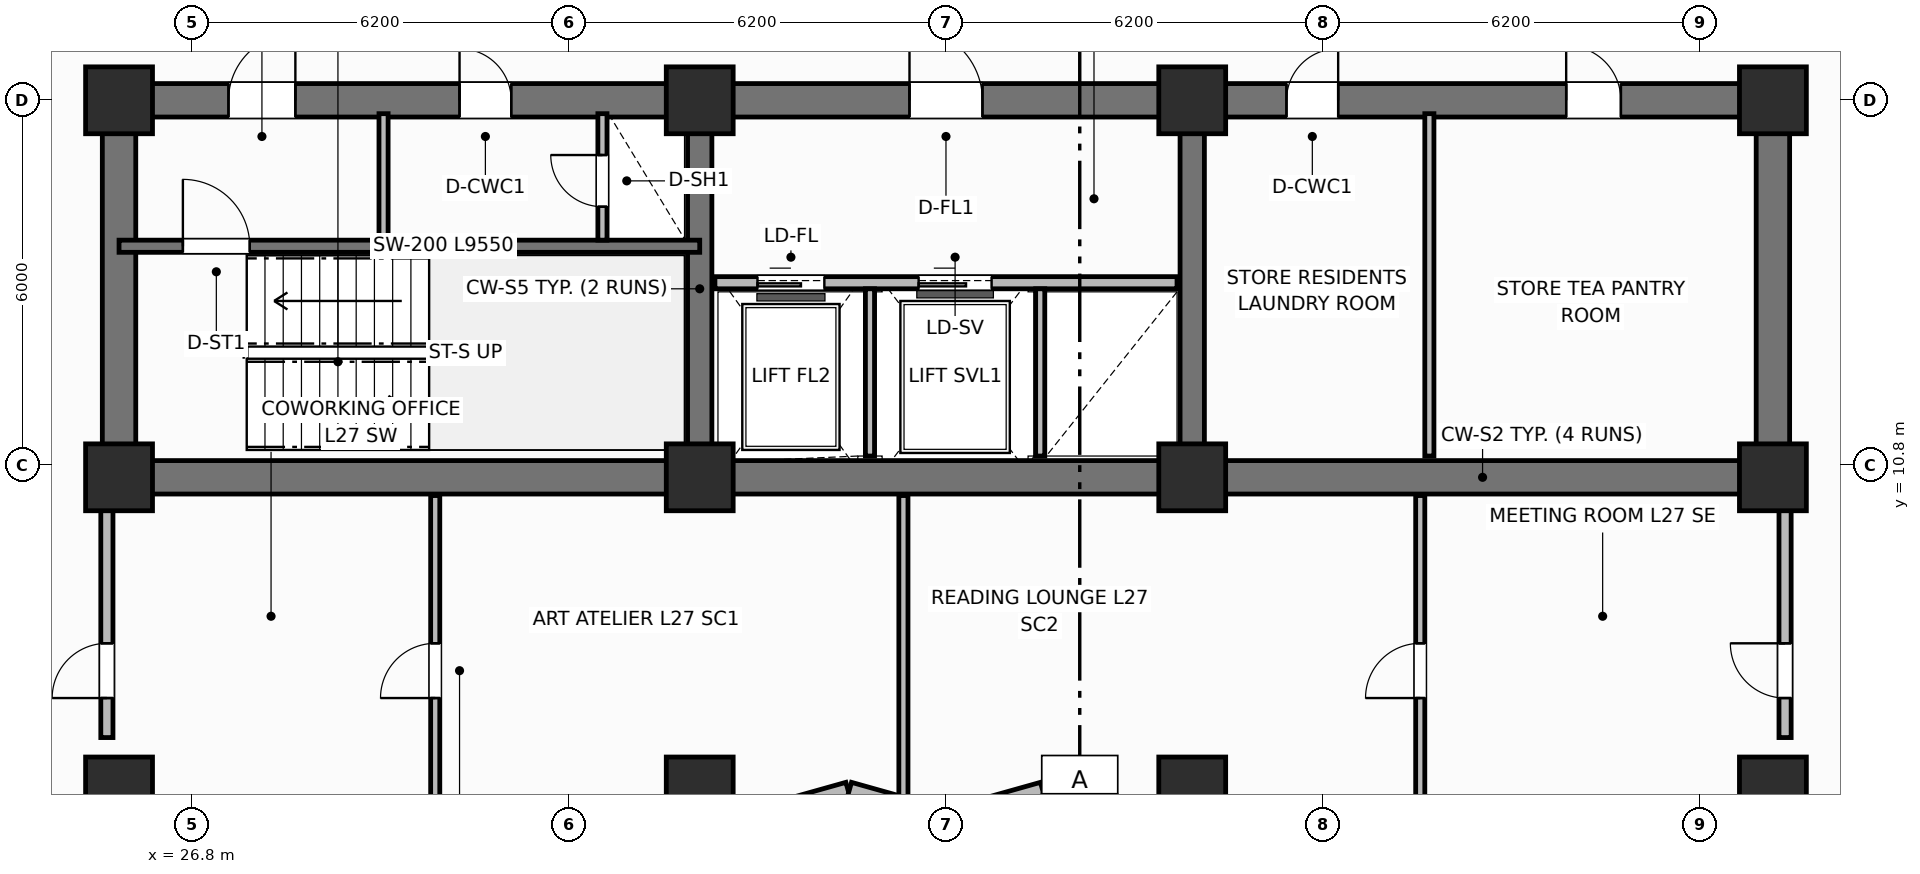
"""IFC4 building model, lengths in metres.
Left out: names, types, materials, properties, quantities, classifications, styles, units other than length and angle.
Written with IfcOpenShell. Run it as: python <this file> out.ifc"""

import sys

from ifc_helpers import new_model, si_unit, direction, frame, frame_2d, origin, origin_2d, place, context, subcontext, project, spatial, rectangle, extrude, element, fill, save


model = new_model("IFC4")
c1 = context("Model", 3, precision=1e-05, world=origin(), true_north=direction((0.0, 1.0)))
c2 = subcontext(c1, "Body", "Model", "MODEL_VIEW")
j1 = project(units=[si_unit("LENGTHUNIT", "METRE"), si_unit("PLANEANGLEUNIT", "RADIAN")], contexts=[c1])
p1 = place(None, origin())
s1 = spatial("IfcSite", under=j1, at=p1, CompositionType="ELEMENT")
p2 = place(p1, origin())
s2 = spatial("IfcBuilding", under=s1, at=p2, CompositionType="ELEMENT")
p3 = place(p2, frame((0.0, 0.0, 110.5)))
s3 = spatial("IfcBuildingStorey", under=s2, at=p3, CompositionType="ELEMENT", Elevation=110.5)
p4 = place(p3, frame((52.8, 10.6, 0.0), z_axis=(0.0, 0.0, 1.0), x_axis=(-1.0, 0.0, 0.0)))
e1 = element("IfcWall", 1, at=p4, inside=s3, PredefinedType="SHEAR", context=c2, shape_type="SweptSolid", body=[
    extrude(rectangle(XDim=27.2, YDim=0.55, at=frame_2d((13.6, 0.0))), origin(), (0.0, 0.0, 1.0), 3.7),
])
for number, where, z_axis, x_axis in (
    (2, (25.6, 10.875, 0.0), (0.0, 0.0, 1.0), (0.0, 1.0, 0.0)),
    (3, (52.8, 10.875, 0.0), (0.0, 0.0, 1.0), (0.0, 1.0, 0.0)),
):
    element("IfcWall", number, at=place(p3, frame(where, z_axis=z_axis, x_axis=x_axis)), inside=s3, PredefinedType="SHEAR", context=c2, shape_type="SweptSolid", body=[
        extrude(rectangle(XDim=5.65, YDim=0.55, at=frame_2d((2.825, 0.0))), origin(), (0.0, 0.0, 1.0), 3.7),
    ])
p5 = place(p3, frame((25.6, 16.8, 0.0), z_axis=(0.0, 0.0, 1.0), x_axis=(1.0, 0.0, 0.0)))
e4 = element("IfcWall", 4, at=p5, inside=s3, PredefinedType="SHEAR", context=c2, shape_type="SweptSolid", body=[
    extrude(rectangle(XDim=27.2, YDim=0.55, at=frame_2d((13.6, 0.0))), origin(), (0.0, 0.0, 1.0), 3.7),
])
p6 = place(p5, frame((1.8, 0.0, 0.0)))
e5 = element("IfcOpeningElement", 5, at=p6, cuts=e4, PredefinedType="OPENING", context=c2, shape_type="SweptSolid", body=[
    extrude(rectangle(XDim=1.1, YDim=2.15, at=frame_2d((0.55, 1.075))), frame((0.0, 0.285, 0.0), z_axis=(0.0, -1.0, 0.0), x_axis=(1.0, 0.0, 0.0)), (0.0, 0.0, 1.0), 0.57),
])
p7 = place(p5, frame((5.6, 0.0, 0.0)))
e6 = element("IfcOpeningElement", 6, at=p7, cuts=e4, PredefinedType="OPENING", context=c2, shape_type="SweptSolid", body=[
    extrude(rectangle(XDim=0.85, YDim=2.1, at=frame_2d((0.425, 1.05))), frame((0.0, 0.285, 0.0), z_axis=(0.0, -1.0, 0.0), x_axis=(1.0, 0.0, 0.0)), (0.0, 0.0, 1.0), 0.57),
])
p8 = place(p5, frame((13.0, 0.0, 0.0)))
e7 = element("IfcOpeningElement", 7, at=p8, cuts=e4, PredefinedType="OPENING", context=c2, shape_type="SweptSolid", body=[
    extrude(rectangle(XDim=1.2, YDim=2.15, at=frame_2d((0.6, 1.075))), frame((0.0, 0.285, 0.0), z_axis=(0.0, -1.0, 0.0), x_axis=(1.0, 0.0, 0.0)), (0.0, 0.0, 1.0), 0.57),
])
p9 = place(p5, frame((19.2, 0.0, 0.0)))
e8 = element("IfcOpeningElement", 8, at=p9, cuts=e4, PredefinedType="OPENING", context=c2, shape_type="SweptSolid", body=[
    extrude(rectangle(XDim=0.85, YDim=2.1, at=frame_2d((0.425, 1.05))), frame((0.0, 0.285, 0.0), z_axis=(0.0, -1.0, 0.0), x_axis=(1.0, 0.0, 0.0)), (0.0, 0.0, 1.0), 0.57),
])
p10 = place(p5, frame((23.8, 0.0, 0.0)))
e9 = element("IfcOpeningElement", 9, at=p10, cuts=e4, PredefinedType="OPENING", context=c2, shape_type="SweptSolid", body=[
    extrude(rectangle(XDim=0.9, YDim=2.1, at=frame_2d((0.45, 1.05))), frame((0.0, 0.285, 0.0), z_axis=(0.0, -1.0, 0.0), x_axis=(1.0, 0.0, 0.0)), (0.0, 0.0, 1.0), 0.57),
])
for number, where, z_axis, x_axis in (
    (10, (35.15, 10.875, 0.0), (0.0, 0.0, 1.0), (0.0, 1.0, 0.0)),
    (11, (43.25, 10.875, 0.0), (0.0, 0.0, 1.0), (0.0, 1.0, 0.0)),
):
    element("IfcWall", number, at=place(p3, frame(where, z_axis=z_axis, x_axis=x_axis)), inside=s3, PredefinedType="SHEAR", context=c2, shape_type="SweptSolid", body=[
        extrude(rectangle(XDim=5.65, YDim=0.4, at=frame_2d((2.825, 0.0))), origin(), (0.0, 0.0, 1.0), 3.7),
    ])
for number, where, z_axis, x_axis in (
    (12, (25.6, 10.6, 0.0), (0.0, 0.0, 1.0), (1.0, 0.0, 0.0)),
    (13, (25.6, 16.8, 0.0), (0.0, 0.0, 1.0), (1.0, 0.0, 0.0)),
    (14, (35.15, 10.6, 0.0), (0.0, 0.0, 1.0), (1.0, 0.0, 0.0)),
    (15, (35.15, 16.8, 0.0), (0.0, 0.0, 1.0), (1.0, 0.0, 0.0)),
    (16, (43.25, 10.6, 0.0), (0.0, 0.0, 1.0), (1.0, 0.0, 0.0)),
    (17, (43.25, 16.8, 0.0), (0.0, 0.0, 1.0), (1.0, 0.0, 0.0)),
    (18, (52.8, 10.6, 0.0), (0.0, 0.0, 1.0), (1.0, 0.0, 0.0)),
    (19, (52.8, 16.8, 0.0), (0.0, 0.0, 1.0), (1.0, 0.0, 0.0)),
    (20, (25.6, 5.45, 0.0), (0.0, 0.0, 1.0), (1.0, 0.0, 0.0)),
    (21, (35.15, 5.45, 0.0), (0.0, 0.0, 1.0), (1.0, 0.0, 0.0)),
    (22, (43.25, 5.45, 0.0), (0.0, 0.0, 1.0), (1.0, 0.0, 0.0)),
    (23, (52.8, 5.45, 0.0), (0.0, 0.0, 1.0), (1.0, 0.0, 0.0)),
):
    element("IfcColumn", number, at=place(p3, frame(where, z_axis=z_axis, x_axis=x_axis)), inside=s3, PredefinedType="COLUMN", context=c2, shape_type="SweptSolid", body=[
        extrude(rectangle(XDim=1.1, YDim=1.1, at=origin_2d()), origin(), (0.0, 0.0, 1.0), 3.7),
    ])
p11 = place(p3, frame((36.0, 4.97, 0.0), z_axis=(0.0, 0.0, 1.0), x_axis=(0.962662902433, 0.270703040766, 0.0)))
e24 = element("IfcWall", 24, at=p11, inside=s3, PredefinedType="SOLIDWALL", context=c2, shape_type="SweptSolid", body=[
    extrude(rectangle(XDim=1.662, YDim=0.34, at=frame_2d((0.831, 0.0))), origin(), (0.0, 0.0, 1.0), 2.7),
])
p12 = place(p3, frame((37.6, 5.42, 0.0), z_axis=(0.0, 0.0, 1.0), x_axis=(0.962652136636, -0.270741322725, 0.0)))
e25 = element("IfcWall", 25, at=p12, inside=s3, PredefinedType="SOLIDWALL", context=c2, shape_type="SweptSolid", body=[
    extrude(rectangle(XDim=1.662, YDim=0.34, at=frame_2d((0.831, 0.0))), origin(), (0.0, 0.0, 1.0), 2.7),
])
p13 = place(p3, frame((39.2, 4.97, 0.0), z_axis=(0.0, 0.0, 1.0), x_axis=(0.962662902433, 0.270703040766, 0.0)))
e26 = element("IfcWall", 26, at=p13, inside=s3, PredefinedType="SOLIDWALL", context=c2, shape_type="SweptSolid", body=[
    extrude(rectangle(XDim=1.662, YDim=0.34, at=frame_2d((0.831, 0.0))), origin(), (0.0, 0.0, 1.0), 2.7),
])
p14 = place(p3, frame((40.8, 5.42, 0.0), z_axis=(0.0, 0.0, 1.0), x_axis=(0.962652136636, -0.270741322725, 0.0)))
e27 = element("IfcWall", 27, at=p14, inside=s3, PredefinedType="SOLIDWALL", context=c2, shape_type="SweptSolid", body=[
    extrude(rectangle(XDim=1.662, YDim=0.34, at=frame_2d((0.831, 0.0))), origin(), (0.0, 0.0, 1.0), 2.7),
])
p15 = place(p3, frame((25.6, 14.4, 0.0), z_axis=(0.0, 0.0, 1.0), x_axis=(1.0, 0.0, 0.0)))
e28 = element("IfcWall", 28, at=p15, inside=s3, PredefinedType="SHEAR", context=c2, shape_type="SweptSolid", body=[
    extrude(rectangle(XDim=9.55, YDim=0.2, at=frame_2d((4.775, 0.0))), origin(), (0.0, 0.0, 1.0), 3.7),
])
p16 = place(p15, frame((1.05, 0.0, 0.0)))
e29 = element("IfcOpeningElement", 29, at=p16, cuts=e28, PredefinedType="OPENING", context=c2, shape_type="SweptSolid", body=[
    extrude(rectangle(XDim=1.1, YDim=2.15, at=frame_2d((0.55, 1.075))), frame((0.0, 0.11, 0.0), z_axis=(0.0, -1.0, 0.0), x_axis=(1.0, 0.0, 0.0)), (0.0, 0.0, 1.0), 0.22),
])
p17 = place(p3, frame((29.95, 14.5, 0.0), z_axis=(0.0, 0.0, 1.0), x_axis=(0.0, 1.0, 0.0)))
e30 = element("IfcWall", 30, at=p17, inside=s3, PredefinedType="PARTITIONING", context=c2, shape_type="SweptSolid", body=[
    extrude(rectangle(XDim=2.08, YDim=0.15, at=frame_2d((1.04, 0.0))), origin(), (0.0, 0.0, 1.0), 2.53),
])
p18 = place(p3, frame((33.55, 14.5, 0.0), z_axis=(0.0, 0.0, 1.0), x_axis=(0.0, 1.0, 0.0)))
e31 = element("IfcWall", 31, at=p18, inside=s3, PredefinedType="PARTITIONING", context=c2, shape_type="SweptSolid", body=[
    extrude(rectangle(XDim=2.08, YDim=0.15, at=frame_2d((1.04, 0.0))), origin(), (0.0, 0.0, 1.0), 2.53),
])
p19 = place(p18, frame((0.55, 0.0, 0.0)))
e32 = element("IfcOpeningElement", 32, at=p19, cuts=e31, PredefinedType="OPENING", context=c2, shape_type="SweptSolid", body=[
    extrude(rectangle(XDim=0.85, YDim=2.05, at=frame_2d((0.425, 1.025))), frame((0.0, 0.085, 0.0), z_axis=(0.0, -1.0, 0.0), x_axis=(1.0, 0.0, 0.0)), (0.0, 0.0, 1.0), 0.17),
])
p20 = place(p3, frame((35.4, 13.8, 0.0), z_axis=(0.0, 0.0, 1.0), x_axis=(1.0, 0.0, 0.0)))
e33 = element("IfcWall", 33, at=p20, inside=s3, PredefinedType="PARTITIONING", context=c2, shape_type="SweptSolid", body=[
    extrude(rectangle(XDim=7.6, YDim=0.2, at=frame_2d((3.8, 0.0))), origin(), (0.0, 0.0, 1.0), 2.3),
])
p21 = place(p20, frame((0.7, 0.0, 0.0)))
e34 = element("IfcOpeningElement", 34, at=p21, cuts=e33, PredefinedType="OPENING", context=c2, shape_type="SweptSolid", body=[
    extrude(rectangle(XDim=1.1, YDim=2.15, at=frame_2d((0.55, 1.075))), frame((0.0, 0.11, 0.0), z_axis=(0.0, -1.0, 0.0), x_axis=(1.0, 0.0, 0.0)), (0.0, 0.0, 1.0), 0.22),
])
p22 = place(p20, frame((3.35, 0.0, 0.0)))
e35 = element("IfcOpeningElement", 35, at=p22, cuts=e33, PredefinedType="OPENING", context=c2, shape_type="SweptSolid", body=[
    extrude(rectangle(XDim=1.2, YDim=2.15, at=frame_2d((0.6, 1.075))), frame((0.0, 0.11, 0.0), z_axis=(0.0, -1.0, 0.0), x_axis=(1.0, 0.0, 0.0)), (0.0, 0.0, 1.0), 0.22),
])
for number, where, z_axis, x_axis in (
    (36, (37.95, 10.95, 0.0), (0.0, 0.0, 1.0), (0.0, 1.0, 0.0)),
    (37, (40.75, 10.95, 0.0), (0.0, 0.0, 1.0), (0.0, 1.0, 0.0)),
):
    element("IfcWall", number, at=place(p3, frame(where, z_axis=z_axis, x_axis=x_axis)), inside=s3, PredefinedType="PARTITIONING", context=c2, shape_type="SweptSolid", body=[
        extrude(rectangle(XDim=2.75, YDim=0.15, at=frame_2d((1.375, 0.0))), origin(), (0.0, 0.0, 1.0), 2.53),
    ])
p23 = place(p3, frame((47.15, 10.95, 0.0), z_axis=(0.0, 0.0, 1.0), x_axis=(0.0, 1.0, 0.0)))
e38 = element("IfcWall", 38, at=p23, inside=s3, PredefinedType="PARTITIONING", context=c2, shape_type="SweptSolid", body=[
    extrude(rectangle(XDim=5.63, YDim=0.15, at=frame_2d((2.815, 0.0))), origin(), (0.0, 0.0, 1.0), 2.53),
])
p24 = place(p3, frame((30.8, 4.97, 0.0), z_axis=(0.0, 0.0, 1.0), x_axis=(0.0, 1.0, 0.0)))
e39 = element("IfcWall", 39, at=p24, inside=s3, PredefinedType="PARTITIONING", context=c2, shape_type="SweptSolid", body=[
    extrude(rectangle(XDim=5.33, YDim=0.15, at=frame_2d((2.665, 0.0))), origin(), (0.0, 0.0, 1.0), 2.53),
])
p25 = place(p24, frame((2.0, 0.0, 0.0)))
e40 = element("IfcOpeningElement", 40, at=p25, cuts=e39, PredefinedType="OPENING", context=c2, shape_type="SweptSolid", body=[
    extrude(rectangle(XDim=0.9, YDim=2.1, at=frame_2d((0.45, 1.05))), frame((0.0, 0.085, 0.0), z_axis=(0.0, -1.0, 0.0), x_axis=(1.0, 0.0, 0.0)), (0.0, 0.0, 1.0), 0.17),
])
p26 = place(p3, frame((38.5, 4.97, 0.0), z_axis=(0.0, 0.0, 1.0), x_axis=(0.0, 1.0, 0.0)))
e41 = element("IfcWall", 41, at=p26, inside=s3, PredefinedType="PARTITIONING", context=c2, shape_type="SweptSolid", body=[
    extrude(rectangle(XDim=5.33, YDim=0.15, at=frame_2d((2.665, 0.0))), origin(), (0.0, 0.0, 1.0), 2.53),
])
p27 = place(p3, frame((47.0, 4.97, 0.0), z_axis=(0.0, 0.0, 1.0), x_axis=(0.0, 1.0, 0.0)))
e42 = element("IfcWall", 42, at=p27, inside=s3, PredefinedType="PARTITIONING", context=c2, shape_type="SweptSolid", body=[
    extrude(rectangle(XDim=5.33, YDim=0.15, at=frame_2d((2.665, 0.0))), origin(), (0.0, 0.0, 1.0), 2.53),
])
p28 = place(p27, frame((2.0, 0.0, 0.0)))
e43 = element("IfcOpeningElement", 43, at=p28, cuts=e42, PredefinedType="OPENING", context=c2, shape_type="SweptSolid", body=[
    extrude(rectangle(XDim=0.9, YDim=2.1, at=frame_2d((0.45, 1.05))), frame((0.0, 0.085, 0.0), z_axis=(0.0, -1.0, 0.0), x_axis=(1.0, 0.0, 0.0)), (0.0, 0.0, 1.0), 0.17),
])
p29 = place(p3, frame((25.4, 6.32, 0.0), z_axis=(0.0, 0.0, 1.0), x_axis=(0.0, 1.0, 0.0)))
e44 = element("IfcWall", 44, at=p29, inside=s3, PredefinedType="PARTITIONING", context=c2, shape_type="SweptSolid", body=[
    extrude(rectangle(XDim=3.98, YDim=0.2, at=frame_2d((1.99, 0.0))), origin(), (0.0, 0.0, 1.0), 2.53),
])
p30 = place(p29, frame((0.65, 0.0, 0.0)))
e45 = element("IfcOpeningElement", 45, at=p30, cuts=e44, PredefinedType="OPENING", context=c2, shape_type="SweptSolid", body=[
    extrude(rectangle(XDim=0.9, YDim=2.1, at=frame_2d((0.45, 1.05))), frame((0.0, 0.11, 0.0), z_axis=(0.0, -1.0, 0.0), x_axis=(1.0, 0.0, 0.0)), (0.0, 0.0, 1.0), 0.22),
])
p31 = place(p3, frame((53.0, 6.32, 0.0), z_axis=(0.0, 0.0, 1.0), x_axis=(0.0, 1.0, 0.0)))
e46 = element("IfcWall", 46, at=p31, inside=s3, PredefinedType="PARTITIONING", context=c2, shape_type="SweptSolid", body=[
    extrude(rectangle(XDim=3.98, YDim=0.2, at=frame_2d((1.99, 0.0))), origin(), (0.0, 0.0, 1.0), 2.53),
])
p32 = place(p31, frame((0.65, 0.0, 0.0)))
e47 = element("IfcOpeningElement", 47, at=p32, cuts=e46, PredefinedType="OPENING", context=c2, shape_type="SweptSolid", body=[
    extrude(rectangle(XDim=0.9, YDim=2.1, at=frame_2d((0.45, 1.05))), frame((0.0, 0.11, 0.0), z_axis=(0.0, -1.0, 0.0), x_axis=(1.0, 0.0, 0.0)), (0.0, 0.0, 1.0), 0.22),
])
p33 = place(p16, origin())
e48 = element("IfcDoor", 48, at=p33, inside=s3, OperationType="SINGLE_SWING_LEFT", PredefinedType="DOOR", context=c2, shape_type="SweptSolid", body=[
    extrude(rectangle(XDim=1.1, YDim=2.15, at=frame_2d((0.55, 1.075))), frame((0.0, 0.025, 0.0), z_axis=(0.0, -1.0, 0.0), x_axis=(1.0, 0.0, 0.0)), (0.0, 0.0, 1.0), 0.05),
])
fill(e29, e48)
p34 = place(p19, origin())
e49 = element("IfcDoor", 49, at=p34, inside=s3, OperationType="SINGLE_SWING_RIGHT", PredefinedType="TRAPDOOR", context=c2, shape_type="SweptSolid", body=[
    extrude(rectangle(XDim=0.85, YDim=2.05, at=frame_2d((0.425, 1.025))), frame((0.0, 0.025, 0.0), z_axis=(0.0, -1.0, 0.0), x_axis=(1.0, 0.0, 0.0)), (0.0, 0.0, 1.0), 0.05),
])
fill(e32, e49)
p35 = place(p21, origin())
e50 = element("IfcDoor", 50, at=p35, inside=s3, OperationType="SLIDING_TO_LEFT", PredefinedType="DOOR", context=c2, shape_type="SweptSolid", body=[
    extrude(rectangle(XDim=1.1, YDim=2.15, at=frame_2d((0.55, 1.075))), frame((0.0, 0.025, 0.0), z_axis=(0.0, -1.0, 0.0), x_axis=(1.0, 0.0, 0.0)), (0.0, 0.0, 1.0), 0.05),
])
fill(e34, e50)
p36 = place(p22, origin())
e51 = element("IfcDoor", 51, at=p36, inside=s3, OperationType="SLIDING_TO_LEFT", PredefinedType="DOOR", context=c2, shape_type="SweptSolid", body=[
    extrude(rectangle(XDim=1.2, YDim=2.15, at=frame_2d((0.6, 1.075))), frame((0.0, 0.025, 0.0), z_axis=(0.0, -1.0, 0.0), x_axis=(1.0, 0.0, 0.0)), (0.0, 0.0, 1.0), 0.05),
])
fill(e35, e51)
p37 = place(p25, origin())
e52 = element("IfcDoor", 52, at=p37, inside=s3, OperationType="SINGLE_SWING_LEFT", PredefinedType="DOOR", context=c2, shape_type="SweptSolid", body=[
    extrude(rectangle(XDim=0.9, YDim=2.1, at=frame_2d((0.45, 1.05))), frame((0.0, 0.025, 0.0), z_axis=(0.0, -1.0, 0.0), x_axis=(1.0, 0.0, 0.0)), (0.0, 0.0, 1.0), 0.05),
])
fill(e40, e52)
p38 = place(p28, origin())
e53 = element("IfcDoor", 53, at=p38, inside=s3, OperationType="SINGLE_SWING_LEFT", PredefinedType="DOOR", context=c2, shape_type="SweptSolid", body=[
    extrude(rectangle(XDim=0.9, YDim=2.1, at=frame_2d((0.45, 1.05))), frame((0.0, 0.025, 0.0), z_axis=(0.0, -1.0, 0.0), x_axis=(1.0, 0.0, 0.0)), (0.0, 0.0, 1.0), 0.05),
])
fill(e43, e53)
p39 = place(p30, origin())
e54 = element("IfcDoor", 54, at=p39, inside=s3, OperationType="SINGLE_SWING_LEFT", PredefinedType="DOOR", context=c2, shape_type="SweptSolid", body=[
    extrude(rectangle(XDim=0.9, YDim=2.1, at=frame_2d((0.45, 1.05))), frame((0.0, 0.025, 0.0), z_axis=(0.0, -1.0, 0.0), x_axis=(1.0, 0.0, 0.0)), (0.0, 0.0, 1.0), 0.05),
])
fill(e45, e54)
p40 = place(p32, origin())
e55 = element("IfcDoor", 55, at=p40, inside=s3, OperationType="SINGLE_SWING_RIGHT", PredefinedType="DOOR", context=c2, shape_type="SweptSolid", body=[
    extrude(rectangle(XDim=0.9, YDim=2.1, at=frame_2d((0.45, 1.05))), frame((0.0, 0.025, 0.0), z_axis=(0.0, -1.0, 0.0), x_axis=(1.0, 0.0, 0.0)), (0.0, 0.0, 1.0), 0.05),
])
fill(e47, e55)
p41 = place(p6, origin())
e56 = element("IfcDoor", 56, at=p41, inside=s3, OperationType="SINGLE_SWING_RIGHT", PredefinedType="DOOR", context=c2, shape_type="SweptSolid", body=[
    extrude(rectangle(XDim=1.1, YDim=2.15, at=frame_2d((0.55, 1.075))), frame((0.0, 0.025, 0.0), z_axis=(0.0, -1.0, 0.0), x_axis=(1.0, 0.0, 0.0)), (0.0, 0.0, 1.0), 0.05),
])
fill(e5, e56)
p42 = place(p7, origin())
e57 = element("IfcDoor", 57, at=p42, inside=s3, OperationType="SINGLE_SWING_LEFT", PredefinedType="DOOR", context=c2, shape_type="SweptSolid", body=[
    extrude(rectangle(XDim=0.85, YDim=2.1, at=frame_2d((0.425, 1.05))), frame((0.0, 0.025, 0.0), z_axis=(0.0, -1.0, 0.0), x_axis=(1.0, 0.0, 0.0)), (0.0, 0.0, 1.0), 0.05),
])
fill(e6, e57)
p43 = place(p8, origin())
e58 = element("IfcDoor", 58, at=p43, inside=s3, OperationType="SINGLE_SWING_LEFT", PredefinedType="DOOR", context=c2, shape_type="SweptSolid", body=[
    extrude(rectangle(XDim=1.2, YDim=2.15, at=frame_2d((0.6, 1.075))), frame((0.0, 0.025, 0.0), z_axis=(0.0, -1.0, 0.0), x_axis=(1.0, 0.0, 0.0)), (0.0, 0.0, 1.0), 0.05),
])
fill(e7, e58)
p44 = place(p9, origin())
e59 = element("IfcDoor", 59, at=p44, inside=s3, OperationType="SINGLE_SWING_RIGHT", PredefinedType="DOOR", context=c2, shape_type="SweptSolid", body=[
    extrude(rectangle(XDim=0.85, YDim=2.1, at=frame_2d((0.425, 1.05))), frame((0.0, 0.025, 0.0), z_axis=(0.0, -1.0, 0.0), x_axis=(1.0, 0.0, 0.0)), (0.0, 0.0, 1.0), 0.05),
])
fill(e8, e59)
p45 = place(p10, origin())
e60 = element("IfcDoor", 60, at=p45, inside=s3, OperationType="SINGLE_SWING_LEFT", PredefinedType="DOOR", context=c2, shape_type="SweptSolid", body=[
    extrude(rectangle(XDim=0.9, YDim=2.1, at=frame_2d((0.45, 1.05))), frame((0.0, 0.025, 0.0), z_axis=(0.0, -1.0, 0.0), x_axis=(1.0, 0.0, 0.0)), (0.0, 0.0, 1.0), 0.05),
])
fill(e9, e60)
save(model, sys.argv[1])
